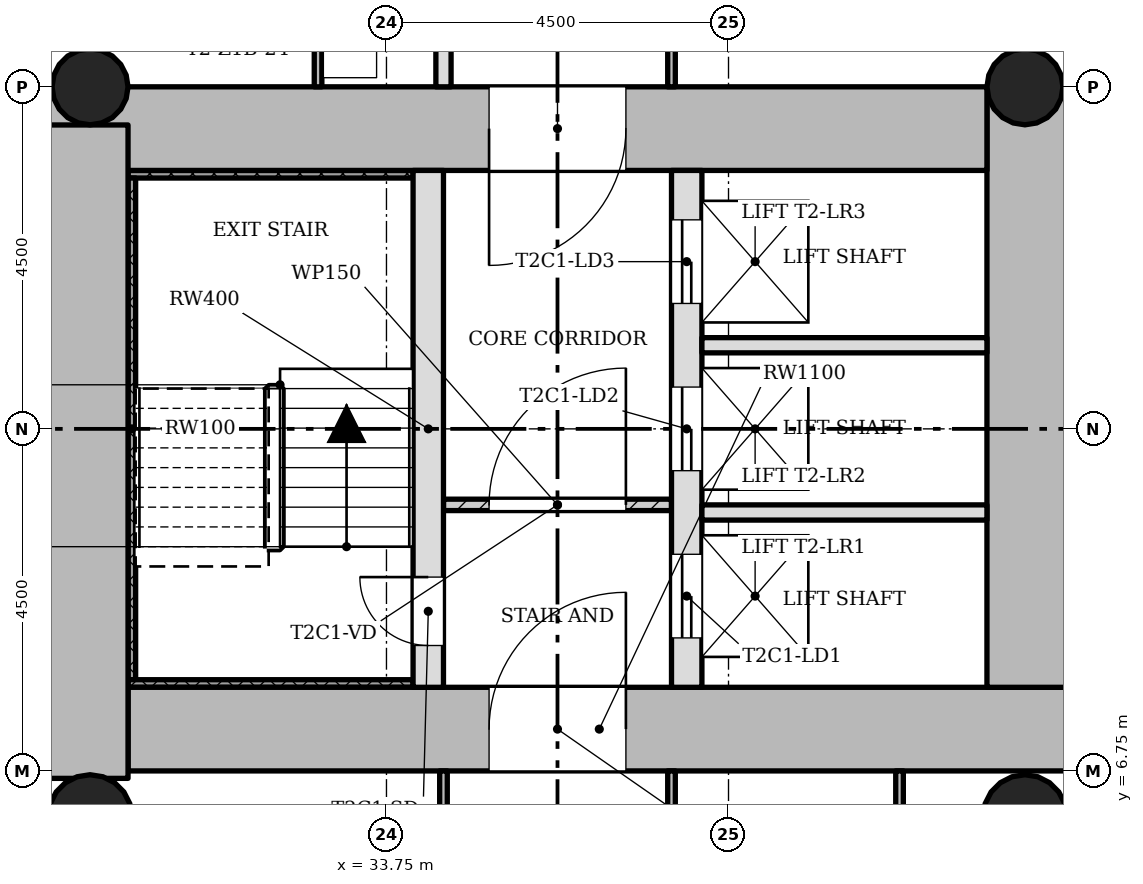
"""IFC4 building model, lengths in metres.
Left out: names, types, materials, properties, quantities, classifications, styles, units other than length and angle.
Written with IfcOpenShell. Run it as: python <this file> out.ifc"""

import sys

from ifc_helpers import new_model, si_unit, direction, frame, frame_2d, origin, origin_2d, place, context, subcontext, project, spatial, rectangle, hollow_circle, extrude, element, fill, save


model = new_model("IFC4")
c1 = context("Model", 3, precision=1e-05, world=origin(), true_north=direction((0.0, 1.0)))
c2 = subcontext(c1, "Body", "Model", "MODEL_VIEW")
j1 = project(units=[si_unit("LENGTHUNIT", "METRE"), si_unit("PLANEANGLEUNIT", "RADIAN")], contexts=[c1])
p1 = place(None, origin())
s1 = spatial("IfcSite", under=j1, at=p1, CompositionType="ELEMENT")
p2 = place(p1, origin())
s2 = spatial("IfcBuilding", under=s1, at=p2, CompositionType="ELEMENT")
p3 = place(p2, frame((0.0, 0.0, 38.1)))
s3 = spatial("IfcBuildingStorey", under=s2, at=p3, CompositionType="ELEMENT", Elevation=38.1)
p4 = place(p3, frame((30.35, 7.3, 0.0), z_axis=(0.0, 0.0, 1.0), x_axis=(1.0, 0.0, 0.0)))
e1 = element("IfcWall", 1, at=p4, inside=s3, PredefinedType="SHEAR", context=c2, shape_type="SweptSolid", body=[
    extrude(rectangle(XDim=12.4, YDim=1.1, at=frame_2d((6.2, 0.0))), origin(), (0.0, 0.0, 1.0), 3.4),
])
p5 = place(p4, frame((4.75, 0.0, 0.0)))
e2 = element("IfcOpeningElement", 2, at=p5, cuts=e1, PredefinedType="OPENING", context=c2, shape_type="SweptSolid", body=[
    extrude(rectangle(XDim=1.8, YDim=2.1, at=frame_2d((0.9, 1.05))), frame((0.0, 0.56, 0.0), z_axis=(0.0, -1.0, 0.0), x_axis=(1.0, 0.0, 0.0)), (0.0, 0.0, 1.0), 1.12),
])
p6 = place(p3, frame((42.2, 7.85, 0.0), z_axis=(0.0, 0.0, 1.0), x_axis=(0.0, 1.0, 0.0)))
e3 = element("IfcWall", 3, at=p6, inside=s3, PredefinedType="SHEAR", context=c2, shape_type="SweptSolid", body=[
    extrude(rectangle(XDim=7.9, YDim=1.1, at=frame_2d((3.95, 0.0))), origin(), (0.0, 0.0, 1.0), 3.4),
])
p7 = place(p3, frame((41.65, 15.2, 0.0), z_axis=(0.0, 0.0, 1.0), x_axis=(-1.0, 0.0, 0.0)))
e4 = element("IfcWall", 4, at=p7, inside=s3, PredefinedType="SHEAR", context=c2, shape_type="SweptSolid", body=[
    extrude(rectangle(XDim=12.4, YDim=1.1, at=frame_2d((6.2, 0.0))), origin(), (0.0, 0.0, 1.0), 3.4),
])
p8 = place(p7, frame((4.75, 0.0, 0.0)))
e5 = element("IfcOpeningElement", 5, at=p8, cuts=e4, PredefinedType="OPENING", context=c2, shape_type="SweptSolid", body=[
    extrude(rectangle(XDim=1.8, YDim=2.1, at=frame_2d((0.9, 1.05))), frame((0.0, 0.56, 0.0), z_axis=(0.0, -1.0, 0.0), x_axis=(1.0, 0.0, 0.0)), (0.0, 0.0, 1.0), 1.12),
])
p9 = place(p3, frame((29.8, 15.248, 0.0), z_axis=(0.0, 0.0, 1.0), x_axis=(0.0, -1.0, 0.0)))
e6 = element("IfcWall", 6, at=p9, inside=s3, PredefinedType="SHEAR", context=c2, shape_type="SweptSolid", body=[
    extrude(rectangle(XDim=8.596, YDim=1.1, at=frame_2d((4.298, 0.0))), origin(), (0.0, 0.0, 1.0), 3.4),
])
p10 = place(p3, frame((34.3, 7.85, 0.0), z_axis=(0.0, 0.0, 1.0), x_axis=(0.0, 1.0, 0.0)))
e7 = element("IfcWall", 7, at=p10, inside=s3, PredefinedType="SHEAR", context=c2, shape_type="SweptSolid", body=[
    extrude(rectangle(XDim=6.8, YDim=0.4, at=frame_2d((3.4, 0.0))), origin(), (0.0, 0.0, 1.0), 3.4),
])
p11 = place(p10, frame((0.55, 0.0, 0.0)))
e8 = element("IfcOpeningElement", 8, at=p11, cuts=e7, PredefinedType="OPENING", context=c2, shape_type="SweptSolid", body=[
    extrude(rectangle(XDim=0.9, YDim=2.1, at=frame_2d((0.45, 1.05))), frame((0.0, 0.21, 0.0), z_axis=(0.0, -1.0, 0.0), x_axis=(1.0, 0.0, 0.0)), (0.0, 0.0, 1.0), 0.42),
])
p12 = place(p3, frame((37.7, 7.85, 0.0), z_axis=(0.0, 0.0, 1.0), x_axis=(0.0, 1.0, 0.0)))
e9 = element("IfcWall", 9, at=p12, inside=s3, PredefinedType="SHEAR", context=c2, shape_type="SweptSolid", body=[
    extrude(rectangle(XDim=6.8, YDim=0.4, at=frame_2d((3.4, 0.0))), origin(), (0.0, 0.0, 1.0), 3.4),
])
p13 = place(p12, frame((0.65, 0.0, 0.0)))
e10 = element("IfcOpeningElement", 10, at=p13, cuts=e9, PredefinedType="OPENING", context=c2, shape_type="SweptSolid", body=[
    extrude(rectangle(XDim=1.1, YDim=2.1, at=frame_2d((0.55, 1.05))), frame((0.0, 0.21, 0.0), z_axis=(0.0, -1.0, 0.0), x_axis=(1.0, 0.0, 0.0)), (0.0, 0.0, 1.0), 0.42),
])
p14 = place(p12, frame((2.85, 0.0, 0.0)))
e11 = element("IfcOpeningElement", 11, at=p14, cuts=e9, PredefinedType="OPENING", context=c2, shape_type="SweptSolid", body=[
    extrude(rectangle(XDim=1.1, YDim=2.1, at=frame_2d((0.55, 1.05))), frame((0.0, 0.21, 0.0), z_axis=(0.0, -1.0, 0.0), x_axis=(1.0, 0.0, 0.0)), (0.0, 0.0, 1.0), 0.42),
])
p15 = place(p12, frame((5.05, 0.0, 0.0)))
e12 = element("IfcOpeningElement", 12, at=p15, cuts=e9, PredefinedType="OPENING", context=c2, shape_type="SweptSolid", body=[
    extrude(rectangle(XDim=1.1, YDim=2.1, at=frame_2d((0.55, 1.05))), frame((0.0, 0.21, 0.0), z_axis=(0.0, -1.0, 0.0), x_axis=(1.0, 0.0, 0.0)), (0.0, 0.0, 1.0), 0.42),
])
for number, where, z_axis, x_axis in (
    (13, (42.15, 15.75, 0.0), (0.0, 0.0, 1.0), (1.0, 0.0, 0.0)),
    (14, (29.85, 15.75, 0.0), (0.0, 0.0, 1.0), (1.0, 0.0, 0.0)),
):
    element("IfcColumn", number, at=place(p3, frame(where, z_axis=z_axis, x_axis=x_axis)), inside=s3, PredefinedType="COLUMN", context=c2, shape_type="SweptSolid", body=[
        extrude(hollow_circle(Radius=0.5, WallThickness=0.036, at=origin_2d()), origin(), (0.0, 0.0, 1.0), 3.4),
    ])
for number, where, z_axis, x_axis in (
    (15, (42.15, 6.15, 0.0), (0.0, 0.0, 1.0), (1.0, 0.0, 0.0)),
    (16, (29.85, 6.15, 0.0), (0.0, 0.0, 1.0), (1.0, 0.0, 0.0)),
):
    element("IfcColumn", number, at=place(p3, frame(where, z_axis=z_axis, x_axis=x_axis)), inside=s3, PredefinedType="COLUMN", context=c2, shape_type="SweptSolid", body=[
        extrude(hollow_circle(Radius=0.55, WallThickness=0.04, at=origin_2d()), origin(), (0.0, 0.0, 1.0), 3.4),
    ])
p16 = place(p3, frame((37.5, 10.25, 0.0), z_axis=(0.0, 0.0, 1.0), x_axis=(-1.0, 0.0, 0.0)))
e17 = element("IfcWall", 17, at=p16, inside=s3, PredefinedType="PARTITIONING", context=c2, shape_type="SweptSolid", body=[
    extrude(rectangle(XDim=3.0, YDim=0.15, at=frame_2d((1.5, 0.0))), origin(), (0.0, 0.0, 1.0), 3.0),
])
p17 = place(p16, frame((0.6, 0.0, 0.0)))
e18 = element("IfcOpeningElement", 18, at=p17, cuts=e17, PredefinedType="OPENING", context=c2, shape_type="SweptSolid", body=[
    extrude(rectangle(XDim=1.8, YDim=2.1, at=frame_2d((0.9, 1.05))), frame((0.0, 0.085, 0.0), z_axis=(0.0, -1.0, 0.0), x_axis=(1.0, 0.0, 0.0)), (0.0, 0.0, 1.0), 0.17),
])
for number, where, z_axis, x_axis in (
    (19, (41.65, 10.15, 0.0), (0.0, 0.0, 1.0), (-1.0, 0.0, 0.0)),
    (20, (41.65, 12.35, 0.0), (0.0, 0.0, 1.0), (-1.0, 0.0, 0.0)),
):
    element("IfcWall", number, at=place(p3, frame(where, z_axis=z_axis, x_axis=x_axis)), inside=s3, PredefinedType="SOLIDWALL", context=c2, shape_type="SweptSolid", body=[
        extrude(rectangle(XDim=3.75, YDim=0.2, at=frame_2d((1.875, 0.0))), origin(), (0.0, 0.0, 1.0), 3.0),
    ])
p18 = place(p3, frame((40.5, 0.9, 0.0), z_axis=(0.0, 0.0, 1.0), x_axis=(0.0, 1.0, 0.0)))
e21 = element("IfcWall", 21, at=p18, inside=s3, PredefinedType="PARTITIONING", context=c2, shape_type="SweptSolid", body=[
    extrude(rectangle(XDim=5.85, YDim=0.1, at=frame_2d((2.925, 0.0))), origin(), (0.0, 0.0, 1.0), 3.0),
])
p19 = place(p3, frame((37.5, 0.9, 0.0), z_axis=(0.0, 0.0, 1.0), x_axis=(0.0, 1.0, 0.0)))
e22 = element("IfcWall", 22, at=p19, inside=s3, PredefinedType="PARTITIONING", context=c2, shape_type="SweptSolid", body=[
    extrude(rectangle(XDim=5.85, YDim=0.1, at=frame_2d((2.925, 0.0))), origin(), (0.0, 0.0, 1.0), 3.0),
])
p20 = place(p19, frame((2.475, 0.0, 0.0)))
e23 = element("IfcOpeningElement", 23, at=p20, cuts=e22, PredefinedType="OPENING", context=c2, shape_type="SweptSolid", body=[
    extrude(rectangle(XDim=0.9, YDim=2.1, at=frame_2d((0.45, 1.05))), frame((0.0, 0.06, 0.0), z_axis=(0.0, -1.0, 0.0), x_axis=(1.0, 0.0, 0.0)), (0.0, 0.0, 1.0), 0.12),
])
p21 = place(p3, frame((37.5, 15.75, 0.0), z_axis=(0.0, 0.0, 1.0), x_axis=(0.0, 1.0, 0.0)))
e24 = element("IfcWall", 24, at=p21, inside=s3, PredefinedType="PARTITIONING", context=c2, shape_type="SweptSolid", body=[
    extrude(rectangle(XDim=4.5, YDim=0.1, at=frame_2d((2.25, 0.0))), origin(), (0.0, 0.0, 1.0), 3.0),
])
p22 = place(p21, frame((1.8, 0.0, 0.0)))
e25 = element("IfcOpeningElement", 25, at=p22, cuts=e24, PredefinedType="OPENING", context=c2, shape_type="SweptSolid", body=[
    extrude(rectangle(XDim=0.9, YDim=2.1, at=frame_2d((0.45, 1.05))), frame((0.0, 0.06, 0.0), z_axis=(0.0, -1.0, 0.0), x_axis=(1.0, 0.0, 0.0)), (0.0, 0.0, 1.0), 0.12),
])
p23 = place(p3, frame((34.5, 0.9, 0.0), z_axis=(0.0, 0.0, 1.0), x_axis=(0.0, 1.0, 0.0)))
e26 = element("IfcWall", 26, at=p23, inside=s3, PredefinedType="PARTITIONING", context=c2, shape_type="SweptSolid", body=[
    extrude(rectangle(XDim=5.85, YDim=0.1, at=frame_2d((2.925, 0.0))), origin(), (0.0, 0.0, 1.0), 3.0),
])
p24 = place(p23, frame((3.675, 0.0, 0.0)))
e27 = element("IfcOpeningElement", 27, at=p24, cuts=e26, PredefinedType="OPENING", context=c2, shape_type="SweptSolid", body=[
    extrude(rectangle(XDim=0.9, YDim=2.1, at=frame_2d((0.45, 1.05))), frame((0.0, 0.06, 0.0), z_axis=(0.0, -1.0, 0.0), x_axis=(1.0, 0.0, 0.0)), (0.0, 0.0, 1.0), 0.12),
])
p25 = place(p3, frame((34.5, 15.75, 0.0), z_axis=(0.0, 0.0, 1.0), x_axis=(0.0, 1.0, 0.0)))
e28 = element("IfcWall", 28, at=p25, inside=s3, PredefinedType="SOLIDWALL", context=c2, shape_type="SweptSolid", body=[
    extrude(rectangle(XDim=4.5, YDim=0.2, at=frame_2d((2.25, 0.0))), origin(), (0.0, 0.0, 1.0), 3.0),
])
p26 = place(p25, frame((3.0, 0.0, 0.0)))
e29 = element("IfcOpeningElement", 29, at=p26, cuts=e28, PredefinedType="OPENING", context=c2, shape_type="SweptSolid", body=[
    extrude(rectangle(XDim=0.9, YDim=2.1, at=frame_2d((0.45, 1.05))), frame((0.0, 0.11, 0.0), z_axis=(0.0, -1.0, 0.0), x_axis=(1.0, 0.0, 0.0)), (0.0, 0.0, 1.0), 0.22),
])
p27 = place(p3, frame((32.85, 15.75, 0.0), z_axis=(0.0, 0.0, 1.0), x_axis=(0.0, 1.0, 0.0)))
e30 = element("IfcWall", 30, at=p27, inside=s3, PredefinedType="PARTITIONING", context=c2, shape_type="SweptSolid", body=[
    extrude(rectangle(XDim=4.5, YDim=0.1, at=frame_2d((2.25, 0.0))), origin(), (0.0, 0.0, 1.0), 3.0),
])
p28 = place(p27, frame((3.0, 0.0, 0.0)))
e31 = element("IfcOpeningElement", 31, at=p28, cuts=e30, PredefinedType="OPENING", context=c2, shape_type="SweptSolid", body=[
    extrude(rectangle(XDim=0.9, YDim=2.1, at=frame_2d((0.45, 1.05))), frame((0.0, 0.06, 0.0), z_axis=(0.0, -1.0, 0.0), x_axis=(1.0, 0.0, 0.0)), (0.0, 0.0, 1.0), 0.12),
])
p29 = place(p3, frame((34.1, 14.6, 0.0), z_axis=(0.0, 0.0, 1.0), x_axis=(-1.0, 0.0, 0.0)))
e32 = element("IfcWall", 32, at=p29, inside=s3, PredefinedType="SHEAR", context=c2, shape_type="SweptSolid", body=[
    extrude(rectangle(XDim=3.75, YDim=0.1, at=frame_2d((1.875, 0.0))), origin(), (0.0, 0.0, 1.0), 3.4),
])
p30 = place(p3, frame((30.4, 7.95, 0.0), z_axis=(0.0, 0.0, 1.0), x_axis=(0.0, 1.0, 0.0)))
e33 = element("IfcWall", 33, at=p30, inside=s3, PredefinedType="SHEAR", context=c2, shape_type="SweptSolid", body=[
    extrude(rectangle(XDim=6.6, YDim=0.1, at=frame_2d((3.3, 0.0))), origin(), (0.0, 0.0, 1.0), 3.4),
])
p31 = place(p3, frame((34.1, 7.9, 0.0), z_axis=(0.0, 0.0, 1.0), x_axis=(-1.0, 0.0, 0.0)))
e34 = element("IfcWall", 34, at=p31, inside=s3, PredefinedType="SHEAR", context=c2, shape_type="SweptSolid", body=[
    extrude(rectangle(XDim=3.75, YDim=0.1, at=frame_2d((1.875, 0.0))), origin(), (0.0, 0.0, 1.0), 3.4),
])
p32 = place(p17, origin())
e35 = element("IfcDoor", 35, at=p32, inside=s3, OperationType="SINGLE_SWING_LEFT", PredefinedType="DOOR", context=c2, shape_type="SweptSolid", body=[
    extrude(rectangle(XDim=1.8, YDim=2.1, at=frame_2d((0.9, 1.05))), frame((0.0, 0.025, 0.0), z_axis=(0.0, -1.0, 0.0), x_axis=(1.0, 0.0, 0.0)), (0.0, 0.0, 1.0), 0.05),
])
fill(e18, e35)
p33 = place(p11, origin())
e36 = element("IfcDoor", 36, at=p33, inside=s3, OperationType="SINGLE_SWING_LEFT", PredefinedType="DOOR", context=c2, shape_type="SweptSolid", body=[
    extrude(rectangle(XDim=0.9, YDim=2.1, at=frame_2d((0.45, 1.05))), frame((0.0, 0.025, 0.0), z_axis=(0.0, -1.0, 0.0), x_axis=(1.0, 0.0, 0.0)), (0.0, 0.0, 1.0), 0.05),
])
fill(e8, e36)
p34 = place(p13, origin())
e37 = element("IfcDoor", 37, at=p34, inside=s3, OperationType="SLIDING_TO_LEFT", PredefinedType="DOOR", context=c2, shape_type="SweptSolid", body=[
    extrude(rectangle(XDim=1.1, YDim=2.1, at=frame_2d((0.55, 1.05))), frame((0.0, 0.025, 0.0), z_axis=(0.0, -1.0, 0.0), x_axis=(1.0, 0.0, 0.0)), (0.0, 0.0, 1.0), 0.05),
])
fill(e10, e37)
p35 = place(p14, origin())
e38 = element("IfcDoor", 38, at=p35, inside=s3, OperationType="SLIDING_TO_LEFT", PredefinedType="DOOR", context=c2, shape_type="SweptSolid", body=[
    extrude(rectangle(XDim=1.1, YDim=2.1, at=frame_2d((0.55, 1.05))), frame((0.0, 0.025, 0.0), z_axis=(0.0, -1.0, 0.0), x_axis=(1.0, 0.0, 0.0)), (0.0, 0.0, 1.0), 0.05),
])
fill(e11, e38)
p36 = place(p15, origin())
e39 = element("IfcDoor", 39, at=p36, inside=s3, OperationType="SLIDING_TO_LEFT", PredefinedType="DOOR", context=c2, shape_type="SweptSolid", body=[
    extrude(rectangle(XDim=1.1, YDim=2.1, at=frame_2d((0.55, 1.05))), frame((0.0, 0.025, 0.0), z_axis=(0.0, -1.0, 0.0), x_axis=(1.0, 0.0, 0.0)), (0.0, 0.0, 1.0), 0.05),
])
fill(e12, e39)
p37 = place(p5, origin())
e40 = element("IfcDoor", 40, at=p37, inside=s3, OperationType="SINGLE_SWING_LEFT", PredefinedType="DOOR", context=c2, shape_type="SweptSolid", body=[
    extrude(rectangle(XDim=1.8, YDim=2.1, at=frame_2d((0.9, 1.05))), frame((0.0, 0.025, 0.0), z_axis=(0.0, -1.0, 0.0), x_axis=(1.0, 0.0, 0.0)), (0.0, 0.0, 1.0), 0.05),
])
fill(e2, e40)
p38 = place(p8, origin())
e41 = element("IfcDoor", 41, at=p38, inside=s3, OperationType="SINGLE_SWING_LEFT", PredefinedType="DOOR", context=c2, shape_type="SweptSolid", body=[
    extrude(rectangle(XDim=1.8, YDim=2.1, at=frame_2d((0.9, 1.05))), frame((0.0, 0.025, 0.0), z_axis=(0.0, -1.0, 0.0), x_axis=(1.0, 0.0, 0.0)), (0.0, 0.0, 1.0), 0.05),
])
fill(e5, e41)
save(model, sys.argv[1])
